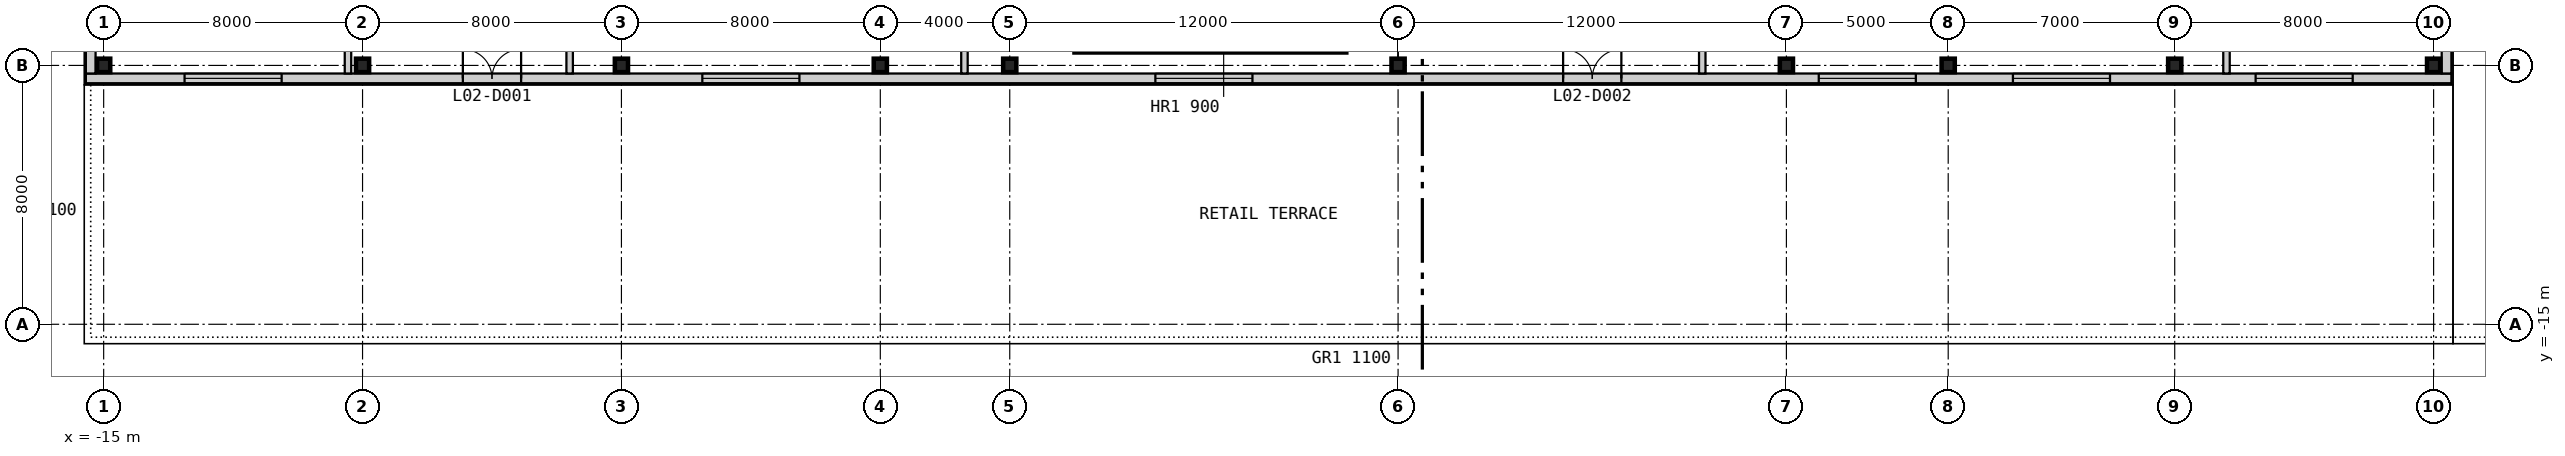
"""IFC4 building model, lengths in metres.
Left out: names, types, materials, properties, quantities, classifications, styles, units other than length and angle.
Written with IfcOpenShell. Run it as: python <this file> out.ifc"""

import sys

from ifc_helpers import new_model, si_unit, direction, frame, frame_2d, origin, origin_2d, place, context, subcontext, project, spatial, rectangle, i_section, extrude, element, fill, save


model = new_model("IFC4")
c1 = context("Model", 3, precision=1e-05, world=origin(), true_north=direction((0.0, 1.0)))
c2 = subcontext(c1, "Body", "Model", "MODEL_VIEW")
j1 = project(units=[si_unit("LENGTHUNIT", "METRE"), si_unit("PLANEANGLEUNIT", "RADIAN")], contexts=[c1])
p1 = place(None, origin())
s1 = spatial("IfcSite", under=j1, at=p1, CompositionType="ELEMENT")
p2 = place(p1, origin())
s2 = spatial("IfcBuilding", under=s1, at=p2, CompositionType="ELEMENT")
p3 = place(p2, frame((0.0, 0.0, 11.8)))
s3 = spatial("IfcBuildingStorey", under=s2, at=p3, CompositionType="ELEMENT", Elevation=11.8)
for number, where, z_axis, x_axis in (
    (1, (-15.0, -7.0, 0.0), (0.0, 0.0, 1.0), (1.0, 0.0, 0.0)),
    (2, (-7.0, -7.0, 0.0), (0.0, 0.0, 1.0), (1.0, 0.0, 0.0)),
    (3, (1.0, -7.0, 0.0), (0.0, 0.0, 1.0), (1.0, 0.0, 0.0)),
    (4, (9.0, -7.0, 0.0), (0.0, 0.0, 1.0), (1.0, 0.0, 0.0)),
    (5, (13.0, -7.0, 0.0), (0.0, 0.0, 1.0), (1.0, 0.0, 0.0)),
    (6, (25.0, -7.0, 0.0), (0.0, 0.0, 1.0), (1.0, 0.0, 0.0)),
    (7, (37.0, -7.0, 0.0), (0.0, 0.0, 1.0), (1.0, 0.0, 0.0)),
    (8, (42.0, -7.0, 0.0), (0.0, 0.0, 1.0), (1.0, 0.0, 0.0)),
    (9, (49.0, -7.0, 0.0), (0.0, 0.0, 1.0), (1.0, 0.0, 0.0)),
    (10, (57.0, -7.0, 0.0), (0.0, 0.0, 1.0), (1.0, 0.0, 0.0)),
):
    element("IfcColumn", number, at=place(p3, frame(where, z_axis=z_axis, x_axis=x_axis)), inside=s3, PredefinedType="COLUMN", context=c2, shape_type="SweptSolid", body=[
        extrude(i_section(OverallWidth=0.406, OverallDepth=0.417, WebThickness=0.03, FlangeThickness=0.048, at=origin_2d()), origin(), (0.0, 0.0, 1.0), 4.8),
    ])
p4 = place(p3, frame((-15.55, -7.4, 0.0), z_axis=(0.0, 0.0, 1.0), x_axis=(1.0, 0.0, 0.0)))
e11 = element("IfcWall", 11, at=p4, inside=s3, PredefinedType="SOLIDWALL", context=c2, shape_type="SweptSolid", body=[
    extrude(rectangle(XDim=73.1, YDim=0.3, at=frame_2d((36.55, 0.0))), origin(), (0.0, 0.0, 1.0), 4.5),
])
p5 = place(p4, frame((11.65, 0.0, 0.0)))
e12 = element("IfcOpeningElement", 12, at=p5, cuts=e11, PredefinedType="OPENING", context=c2, shape_type="SweptSolid", body=[
    extrude(rectangle(XDim=1.8, YDim=2.4, at=frame_2d((0.9, 1.2))), frame((0.0, 0.16, 0.0), z_axis=(0.0, -1.0, 0.0), x_axis=(1.0, 0.0, 0.0)), (0.0, 0.0, 1.0), 0.32),
])
p6 = place(p4, frame((45.65, 0.0, 0.0)))
e13 = element("IfcOpeningElement", 13, at=p6, cuts=e11, PredefinedType="OPENING", context=c2, shape_type="SweptSolid", body=[
    extrude(rectangle(XDim=1.8, YDim=2.4, at=frame_2d((0.9, 1.2))), frame((0.0, 0.16, 0.0), z_axis=(0.0, -1.0, 0.0), x_axis=(1.0, 0.0, 0.0)), (0.0, 0.0, 1.0), 0.32),
])
p7 = place(p4, frame((3.05, 0.0, 0.9)))
e14 = element("IfcOpeningElement", 14, at=p7, cuts=e11, PredefinedType="OPENING", context=c2, shape_type="SweptSolid", body=[
    extrude(rectangle(XDim=3.0, YDim=2.4, at=frame_2d((1.5, 1.2))), frame((0.0, 0.16, 0.0), z_axis=(0.0, -1.0, 0.0), x_axis=(1.0, 0.0, 0.0)), (0.0, 0.0, 1.0), 0.32),
])
p8 = place(p4, frame((19.05, 0.0, 0.9)))
e15 = element("IfcOpeningElement", 15, at=p8, cuts=e11, PredefinedType="OPENING", context=c2, shape_type="SweptSolid", body=[
    extrude(rectangle(XDim=3.0, YDim=2.4, at=frame_2d((1.5, 1.2))), frame((0.0, 0.16, 0.0), z_axis=(0.0, -1.0, 0.0), x_axis=(1.0, 0.0, 0.0)), (0.0, 0.0, 1.0), 0.32),
])
p9 = place(p4, frame((33.05, 0.0, 0.9)))
e16 = element("IfcOpeningElement", 16, at=p9, cuts=e11, PredefinedType="OPENING", context=c2, shape_type="SweptSolid", body=[
    extrude(rectangle(XDim=3.0, YDim=2.4, at=frame_2d((1.5, 1.2))), frame((0.0, 0.16, 0.0), z_axis=(0.0, -1.0, 0.0), x_axis=(1.0, 0.0, 0.0)), (0.0, 0.0, 1.0), 0.32),
])
p10 = place(p4, frame((53.55, 0.0, 0.9)))
e17 = element("IfcOpeningElement", 17, at=p10, cuts=e11, PredefinedType="OPENING", context=c2, shape_type="SweptSolid", body=[
    extrude(rectangle(XDim=3.0, YDim=2.4, at=frame_2d((1.5, 1.2))), frame((0.0, 0.16, 0.0), z_axis=(0.0, -1.0, 0.0), x_axis=(1.0, 0.0, 0.0)), (0.0, 0.0, 1.0), 0.32),
])
p11 = place(p4, frame((59.55, 0.0, 0.9)))
e18 = element("IfcOpeningElement", 18, at=p11, cuts=e11, PredefinedType="OPENING", context=c2, shape_type="SweptSolid", body=[
    extrude(rectangle(XDim=3.0, YDim=2.4, at=frame_2d((1.5, 1.2))), frame((0.0, 0.16, 0.0), z_axis=(0.0, -1.0, 0.0), x_axis=(1.0, 0.0, 0.0)), (0.0, 0.0, 1.0), 0.32),
])
p12 = place(p4, frame((67.05, 0.0, 0.9)))
e19 = element("IfcOpeningElement", 19, at=p12, cuts=e11, PredefinedType="OPENING", context=c2, shape_type="SweptSolid", body=[
    extrude(rectangle(XDim=3.0, YDim=2.4, at=frame_2d((1.5, 1.2))), frame((0.0, 0.16, 0.0), z_axis=(0.0, -1.0, 0.0), x_axis=(1.0, 0.0, 0.0)), (0.0, 0.0, 1.0), 0.32),
])
p13 = place(p3, frame((57.4, -7.25, 0.0), z_axis=(0.0, 0.0, 1.0), x_axis=(0.0, 1.0, 0.0)))
e20 = element("IfcWall", 20, at=p13, inside=s3, PredefinedType="SOLIDWALL", context=c2, shape_type="SweptSolid", body=[
    extrude(rectangle(XDim=72.5, YDim=0.3, at=frame_2d((36.25, 0.0))), origin(), (0.0, 0.0, 1.0), 4.5),
])
p14 = place(p13, frame((25.35, 0.0, 0.0)))
e21 = element("IfcOpeningElement", 21, at=p14, cuts=e20, PredefinedType="OPENING", context=c2, shape_type="SweptSolid", body=[
    extrude(rectangle(XDim=1.8, YDim=2.4, at=frame_2d((0.9, 1.2))), frame((0.0, 0.16, 0.0), z_axis=(0.0, -1.0, 0.0), x_axis=(1.0, 0.0, 0.0)), (0.0, 0.0, 1.0), 0.32),
])
p15 = place(p13, frame((45.85, 0.0, 0.0)))
e22 = element("IfcOpeningElement", 22, at=p15, cuts=e20, PredefinedType="OPENING", context=c2, shape_type="SweptSolid", body=[
    extrude(rectangle(XDim=1.8, YDim=2.4, at=frame_2d((0.9, 1.2))), frame((0.0, 0.16, 0.0), z_axis=(0.0, -1.0, 0.0), x_axis=(1.0, 0.0, 0.0)), (0.0, 0.0, 1.0), 0.32),
])
p16 = place(p13, frame((59.35, 0.0, 0.0)))
e23 = element("IfcOpeningElement", 23, at=p16, cuts=e20, PredefinedType="OPENING", context=c2, shape_type="SweptSolid", body=[
    extrude(rectangle(XDim=1.8, YDim=2.4, at=frame_2d((0.9, 1.2))), frame((0.0, 0.16, 0.0), z_axis=(0.0, -1.0, 0.0), x_axis=(1.0, 0.0, 0.0)), (0.0, 0.0, 1.0), 0.32),
])
p17 = place(p13, frame((2.75, 0.0, 0.9)))
e24 = element("IfcOpeningElement", 24, at=p17, cuts=e20, PredefinedType="OPENING", context=c2, shape_type="SweptSolid", body=[
    extrude(rectangle(XDim=3.0, YDim=2.4, at=frame_2d((1.5, 1.2))), frame((0.0, 0.16, 0.0), z_axis=(0.0, -1.0, 0.0), x_axis=(1.0, 0.0, 0.0)), (0.0, 0.0, 1.0), 0.32),
])
p18 = place(p13, frame((10.75, 0.0, 0.9)))
e25 = element("IfcOpeningElement", 25, at=p18, cuts=e20, PredefinedType="OPENING", context=c2, shape_type="SweptSolid", body=[
    extrude(rectangle(XDim=3.0, YDim=2.4, at=frame_2d((1.5, 1.2))), frame((0.0, 0.16, 0.0), z_axis=(0.0, -1.0, 0.0), x_axis=(1.0, 0.0, 0.0)), (0.0, 0.0, 1.0), 0.32),
])
p19 = place(p13, frame((36.75, 0.0, 0.9)))
e26 = element("IfcOpeningElement", 26, at=p19, cuts=e20, PredefinedType="OPENING", context=c2, shape_type="SweptSolid", body=[
    extrude(rectangle(XDim=3.0, YDim=2.4, at=frame_2d((1.5, 1.2))), frame((0.0, 0.16, 0.0), z_axis=(0.0, -1.0, 0.0), x_axis=(1.0, 0.0, 0.0)), (0.0, 0.0, 1.0), 0.32),
])
p20 = place(p13, frame((51.25, 0.0, 0.9)))
e27 = element("IfcOpeningElement", 27, at=p20, cuts=e20, PredefinedType="OPENING", context=c2, shape_type="SweptSolid", body=[
    extrude(rectangle(XDim=3.0, YDim=2.4, at=frame_2d((1.5, 1.2))), frame((0.0, 0.16, 0.0), z_axis=(0.0, -1.0, 0.0), x_axis=(1.0, 0.0, 0.0)), (0.0, 0.0, 1.0), 0.32),
])
p21 = place(p13, frame((66.75, 0.0, 0.9)))
e28 = element("IfcOpeningElement", 28, at=p21, cuts=e20, PredefinedType="OPENING", context=c2, shape_type="SweptSolid", body=[
    extrude(rectangle(XDim=3.0, YDim=2.4, at=frame_2d((1.5, 1.2))), frame((0.0, 0.16, 0.0), z_axis=(0.0, -1.0, 0.0), x_axis=(1.0, 0.0, 0.0)), (0.0, 0.0, 1.0), 0.32),
])
p22 = place(p3, frame((-15.4, 65.25, 0.0), z_axis=(0.0, 0.0, 1.0), x_axis=(0.0, -1.0, 0.0)))
e29 = element("IfcWall", 29, at=p22, inside=s3, PredefinedType="SOLIDWALL", context=c2, shape_type="SweptSolid", body=[
    extrude(rectangle(XDim=72.5, YDim=0.3, at=frame_2d((36.25, 0.0))), origin(), (0.0, 0.0, 1.0), 4.5),
])
p23 = place(p22, frame((66.75, 0.0, 0.9)))
e30 = element("IfcOpeningElement", 30, at=p23, cuts=e29, PredefinedType="OPENING", context=c2, shape_type="SweptSolid", body=[
    extrude(rectangle(XDim=3.0, YDim=2.4, at=frame_2d((1.5, 1.2))), frame((0.0, 0.16, 0.0), z_axis=(0.0, -1.0, 0.0), x_axis=(1.0, 0.0, 0.0)), (0.0, 0.0, 1.0), 0.32),
])
p24 = place(p22, frame((58.75, 0.0, 0.9)))
e31 = element("IfcOpeningElement", 31, at=p24, cuts=e29, PredefinedType="OPENING", context=c2, shape_type="SweptSolid", body=[
    extrude(rectangle(XDim=3.0, YDim=2.4, at=frame_2d((1.5, 1.2))), frame((0.0, 0.16, 0.0), z_axis=(0.0, -1.0, 0.0), x_axis=(1.0, 0.0, 0.0)), (0.0, 0.0, 1.0), 0.32),
])
p25 = place(p22, frame((44.75, 0.0, 0.9)))
e32 = element("IfcOpeningElement", 32, at=p25, cuts=e29, PredefinedType="OPENING", context=c2, shape_type="SweptSolid", body=[
    extrude(rectangle(XDim=3.0, YDim=2.4, at=frame_2d((1.5, 1.2))), frame((0.0, 0.16, 0.0), z_axis=(0.0, -1.0, 0.0), x_axis=(1.0, 0.0, 0.0)), (0.0, 0.0, 1.0), 0.32),
])
p26 = place(p22, frame((32.75, 0.0, 0.9)))
e33 = element("IfcOpeningElement", 33, at=p26, cuts=e29, PredefinedType="OPENING", context=c2, shape_type="SweptSolid", body=[
    extrude(rectangle(XDim=3.0, YDim=2.4, at=frame_2d((1.5, 1.2))), frame((0.0, 0.16, 0.0), z_axis=(0.0, -1.0, 0.0), x_axis=(1.0, 0.0, 0.0)), (0.0, 0.0, 1.0), 0.32),
])
p27 = place(p22, frame((24.25, 0.0, 0.9)))
e34 = element("IfcOpeningElement", 34, at=p27, cuts=e29, PredefinedType="OPENING", context=c2, shape_type="SweptSolid", body=[
    extrude(rectangle(XDim=3.0, YDim=2.4, at=frame_2d((1.5, 1.2))), frame((0.0, 0.16, 0.0), z_axis=(0.0, -1.0, 0.0), x_axis=(1.0, 0.0, 0.0)), (0.0, 0.0, 1.0), 0.32),
])
p28 = place(p22, frame((18.25, 0.0, 0.9)))
e35 = element("IfcOpeningElement", 35, at=p28, cuts=e29, PredefinedType="OPENING", context=c2, shape_type="SweptSolid", body=[
    extrude(rectangle(XDim=3.0, YDim=2.4, at=frame_2d((1.5, 1.2))), frame((0.0, 0.16, 0.0), z_axis=(0.0, -1.0, 0.0), x_axis=(1.0, 0.0, 0.0)), (0.0, 0.0, 1.0), 0.32),
])
p29 = place(p22, frame((10.75, 0.0, 0.9)))
e36 = element("IfcOpeningElement", 36, at=p29, cuts=e29, PredefinedType="OPENING", context=c2, shape_type="SweptSolid", body=[
    extrude(rectangle(XDim=3.0, YDim=2.4, at=frame_2d((1.5, 1.2))), frame((0.0, 0.16, 0.0), z_axis=(0.0, -1.0, 0.0), x_axis=(1.0, 0.0, 0.0)), (0.0, 0.0, 1.0), 0.32),
])
p30 = place(p22, frame((2.75, 0.0, 0.9)))
e37 = element("IfcOpeningElement", 37, at=p30, cuts=e29, PredefinedType="OPENING", context=c2, shape_type="SweptSolid", body=[
    extrude(rectangle(XDim=3.0, YDim=2.4, at=frame_2d((1.5, 1.2))), frame((0.0, 0.16, 0.0), z_axis=(0.0, -1.0, 0.0), x_axis=(1.0, 0.0, 0.0)), (0.0, 0.0, 1.0), 0.32),
])
p31 = place(p3, frame((-7.45, -7.25, 0.0), z_axis=(0.0, 0.0, 1.0), x_axis=(0.0, 1.0, 0.0)))
e38 = element("IfcWall", 38, at=p31, inside=s3, PredefinedType="PARTITIONING", context=c2, shape_type="SweptSolid", body=[
    extrude(rectangle(XDim=18.85, YDim=0.2, at=frame_2d((9.425, 0.0))), origin(), (0.0, 0.0, 1.0), 4.5),
])
p32 = place(p3, frame((-0.6, -7.25, 0.0), z_axis=(0.0, 0.0, 1.0), x_axis=(0.0, 1.0, 0.0)))
e39 = element("IfcWall", 39, at=p32, inside=s3, PredefinedType="PARTITIONING", context=c2, shape_type="SweptSolid", body=[
    extrude(rectangle(XDim=6.65, YDim=0.2, at=frame_2d((3.325, 0.0))), origin(), (0.0, 0.0, 1.0), 4.5),
])
p33 = place(p3, frame((11.6, -7.25, 0.0), z_axis=(0.0, 0.0, 1.0), x_axis=(0.0, 1.0, 0.0)))
e40 = element("IfcWall", 40, at=p33, inside=s3, PredefinedType="PARTITIONING", context=c2, shape_type="SweptSolid", body=[
    extrude(rectangle(XDim=14.25, YDim=0.2, at=frame_2d((7.125, 0.0))), origin(), (0.0, 0.0, 1.0), 4.5),
])
p34 = place(p33, frame((2.45, 0.0, 0.0)))
e41 = element("IfcOpeningElement", 41, at=p34, cuts=e40, PredefinedType="OPENING", context=c2, shape_type="SweptSolid", body=[
    extrude(rectangle(XDim=1.8, YDim=2.4, at=frame_2d((0.9, 1.2))), frame((0.0, 0.11, 0.0), z_axis=(0.0, -1.0, 0.0), x_axis=(1.0, 0.0, 0.0)), (0.0, 0.0, 1.0), 0.22),
])
p35 = place(p33, frame((9.525, 0.0, 0.0)))
e42 = element("IfcOpeningElement", 42, at=p35, cuts=e40, PredefinedType="OPENING", context=c2, shape_type="SweptSolid", body=[
    extrude(rectangle(XDim=1.8, YDim=2.4, at=frame_2d((0.9, 1.2))), frame((0.0, 0.11, 0.0), z_axis=(0.0, -1.0, 0.0), x_axis=(1.0, 0.0, 0.0)), (0.0, 0.0, 1.0), 0.22),
])
p36 = place(p3, frame((34.4, -7.25, 0.0), z_axis=(0.0, 0.0, 1.0), x_axis=(0.0, 1.0, 0.0)))
e43 = element("IfcWall", 43, at=p36, inside=s3, PredefinedType="PARTITIONING", context=c2, shape_type="SweptSolid", body=[
    extrude(rectangle(XDim=14.25, YDim=0.2, at=frame_2d((7.125, 0.0))), origin(), (0.0, 0.0, 1.0), 4.5),
])
p37 = place(p36, frame((2.45, 0.0, 0.0)))
e44 = element("IfcOpeningElement", 44, at=p37, cuts=e43, PredefinedType="OPENING", context=c2, shape_type="SweptSolid", body=[
    extrude(rectangle(XDim=1.8, YDim=2.4, at=frame_2d((0.9, 1.2))), frame((0.0, 0.11, 0.0), z_axis=(0.0, -1.0, 0.0), x_axis=(1.0, 0.0, 0.0)), (0.0, 0.0, 1.0), 0.22),
])
p38 = place(p36, frame((9.525, 0.0, 0.0)))
e45 = element("IfcOpeningElement", 45, at=p38, cuts=e43, PredefinedType="OPENING", context=c2, shape_type="SweptSolid", body=[
    extrude(rectangle(XDim=1.8, YDim=2.4, at=frame_2d((0.9, 1.2))), frame((0.0, 0.11, 0.0), z_axis=(0.0, -1.0, 0.0), x_axis=(1.0, 0.0, 0.0)), (0.0, 0.0, 1.0), 0.22),
])
p39 = place(p3, frame((50.6, -7.25, 0.0), z_axis=(0.0, 0.0, 1.0), x_axis=(0.0, 1.0, 0.0)))
e46 = element("IfcWall", 46, at=p39, inside=s3, PredefinedType="PARTITIONING", context=c2, shape_type="SweptSolid", body=[
    extrude(rectangle(XDim=6.65, YDim=0.2, at=frame_2d((3.325, 0.0))), origin(), (0.0, 0.0, 1.0), 4.5),
])
p40 = place(p5, origin())
e47 = element("IfcDoor", 47, at=p40, inside=s3, OperationType="DOUBLE_DOOR_SINGLE_SWING", PredefinedType="DOOR", context=c2, shape_type="SweptSolid", body=[
    extrude(rectangle(XDim=1.8, YDim=2.4, at=frame_2d((0.9, 1.2))), frame((0.0, 0.025, 0.0), z_axis=(0.0, -1.0, 0.0), x_axis=(1.0, 0.0, 0.0)), (0.0, 0.0, 1.0), 0.05),
])
fill(e12, e47)
p41 = place(p6, origin())
e48 = element("IfcDoor", 48, at=p41, inside=s3, OperationType="DOUBLE_DOOR_SINGLE_SWING", PredefinedType="DOOR", context=c2, shape_type="SweptSolid", body=[
    extrude(rectangle(XDim=1.8, YDim=2.4, at=frame_2d((0.9, 1.2))), frame((0.0, 0.025, 0.0), z_axis=(0.0, -1.0, 0.0), x_axis=(1.0, 0.0, 0.0)), (0.0, 0.0, 1.0), 0.05),
])
fill(e13, e48)
p42 = place(p7, origin())
e49 = element("IfcWindow", 49, at=p42, inside=s3, PartitioningType="SINGLE_PANEL", PredefinedType="WINDOW", context=c2, shape_type="SweptSolid", body=[
    extrude(rectangle(XDim=3.0, YDim=2.4, at=frame_2d((1.5, 1.2))), frame((0.0, 0.03, 0.0), z_axis=(0.0, -1.0, 0.0), x_axis=(1.0, 0.0, 0.0)), (0.0, 0.0, 1.0), 0.06),
])
fill(e14, e49)
p43 = place(p8, origin())
e50 = element("IfcWindow", 50, at=p43, inside=s3, PartitioningType="SINGLE_PANEL", PredefinedType="WINDOW", context=c2, shape_type="SweptSolid", body=[
    extrude(rectangle(XDim=3.0, YDim=2.4, at=frame_2d((1.5, 1.2))), frame((0.0, 0.03, 0.0), z_axis=(0.0, -1.0, 0.0), x_axis=(1.0, 0.0, 0.0)), (0.0, 0.0, 1.0), 0.06),
])
fill(e15, e50)
p44 = place(p9, origin())
e51 = element("IfcWindow", 51, at=p44, inside=s3, PartitioningType="SINGLE_PANEL", PredefinedType="WINDOW", context=c2, shape_type="SweptSolid", body=[
    extrude(rectangle(XDim=3.0, YDim=2.4, at=frame_2d((1.5, 1.2))), frame((0.0, 0.03, 0.0), z_axis=(0.0, -1.0, 0.0), x_axis=(1.0, 0.0, 0.0)), (0.0, 0.0, 1.0), 0.06),
])
fill(e16, e51)
p45 = place(p10, origin())
e52 = element("IfcWindow", 52, at=p45, inside=s3, PartitioningType="SINGLE_PANEL", PredefinedType="WINDOW", context=c2, shape_type="SweptSolid", body=[
    extrude(rectangle(XDim=3.0, YDim=2.4, at=frame_2d((1.5, 1.2))), frame((0.0, 0.03, 0.0), z_axis=(0.0, -1.0, 0.0), x_axis=(1.0, 0.0, 0.0)), (0.0, 0.0, 1.0), 0.06),
])
fill(e17, e52)
p46 = place(p11, origin())
e53 = element("IfcWindow", 53, at=p46, inside=s3, PartitioningType="SINGLE_PANEL", PredefinedType="WINDOW", context=c2, shape_type="SweptSolid", body=[
    extrude(rectangle(XDim=3.0, YDim=2.4, at=frame_2d((1.5, 1.2))), frame((0.0, 0.03, 0.0), z_axis=(0.0, -1.0, 0.0), x_axis=(1.0, 0.0, 0.0)), (0.0, 0.0, 1.0), 0.06),
])
fill(e18, e53)
p47 = place(p12, origin())
e54 = element("IfcWindow", 54, at=p47, inside=s3, PartitioningType="SINGLE_PANEL", PredefinedType="WINDOW", context=c2, shape_type="SweptSolid", body=[
    extrude(rectangle(XDim=3.0, YDim=2.4, at=frame_2d((1.5, 1.2))), frame((0.0, 0.03, 0.0), z_axis=(0.0, -1.0, 0.0), x_axis=(1.0, 0.0, 0.0)), (0.0, 0.0, 1.0), 0.06),
])
fill(e19, e54)
save(model, sys.argv[1])
